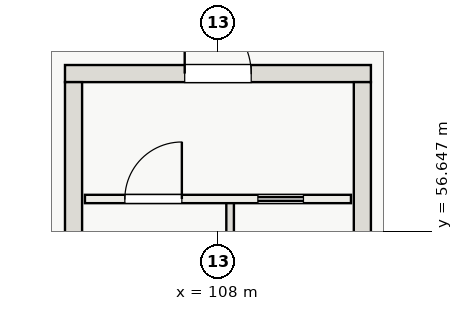
"""IFC4 building model, lengths in metres.
Left out: names, types, materials, properties, quantities, classifications, styles, units other than length and angle.
Written with IfcOpenShell. Run it as: python <this file> out.ifc"""

import sys

from ifc_helpers import new_model, si_unit, direction, frame, frame_2d, origin, place, context, subcontext, project, spatial, rectangle, extrude, element, fill, save


model = new_model("IFC4")
c1 = context("Model", 3, precision=1e-05, world=origin(), true_north=direction((0.0, 1.0)))
c2 = subcontext(c1, "Body", "Model", "MODEL_VIEW")
j1 = project(units=[si_unit("LENGTHUNIT", "METRE"), si_unit("PLANEANGLEUNIT", "RADIAN")], contexts=[c1])
p1 = place(None, origin())
s1 = spatial("IfcSite", under=j1, at=p1, CompositionType="ELEMENT")
p2 = place(p1, origin())
s2 = spatial("IfcBuilding", under=s1, at=p2, CompositionType="ELEMENT")
p3 = place(p2, frame((0.0, 0.0, 21.6)))
s3 = spatial("IfcBuildingStorey", under=s2, at=p3, CompositionType="ELEMENT", Elevation=21.6)
p4 = place(p3, frame((103.975, 60.8, 0.0), z_axis=(0.0, 0.0, 1.0), x_axis=(1.0, 0.0, 0.0)))
e1 = element("IfcWall", 1, at=p4, inside=s3, PredefinedType="SHEAR", context=c2, shape_type="SweptSolid", body=[
    extrude(rectangle(XDim=8.05, YDim=0.45, at=frame_2d((4.025, 0.0))), origin(), (0.0, 0.0, 1.0), 4.8),
])
p5 = place(p4, frame((3.15, 0.0, 0.0)))
e2 = element("IfcOpeningElement", 2, at=p5, cuts=e1, PredefinedType="OPENING", context=c2, shape_type="SweptSolid", body=[
    extrude(rectangle(XDim=1.75, YDim=2.3, at=frame_2d((0.875, 1.15))), frame((0.0, 0.235, 0.0), z_axis=(0.0, -1.0, 0.0), x_axis=(1.0, 0.0, 0.0)), (0.0, 0.0, 1.0), 0.47),
])
for number, where, z_axis, x_axis in (
    (3, (104.2, 49.425, 0.0), (0.0, 0.0, 1.0), (0.0, 1.0, 0.0)),
    (4, (111.8, 49.425, 0.0), (0.0, 0.0, 1.0), (0.0, 1.0, 0.0)),
):
    element("IfcWall", number, at=place(p3, frame(where, z_axis=z_axis, x_axis=x_axis)), inside=s3, PredefinedType="SHEAR", context=c2, shape_type="SweptSolid", body=[
        extrude(rectangle(XDim=11.15, YDim=0.45, at=frame_2d((5.575, 0.0))), origin(), (0.0, 0.0, 1.0), 4.8),
    ])
p6 = place(p3, frame((108.32, 49.45, 0.0), z_axis=(0.0, 0.0, 1.0), x_axis=(0.0, 1.0, 0.0)))
e5 = element("IfcWall", 5, at=p6, inside=s3, PredefinedType="SOLIDWALL", context=c2, shape_type="SweptSolid", body=[
    extrude(rectangle(XDim=8.0, YDim=0.2, at=frame_2d((4.0, 0.0))), origin(), (0.0, 0.0, 1.0), 4.8),
])
p7 = place(p3, frame((104.5, 57.5, 0.0), z_axis=(0.0, 0.0, 1.0), x_axis=(1.0, 0.0, 0.0)))
e6 = element("IfcWall", 6, at=p7, inside=s3, PredefinedType="SOLIDWALL", context=c2, shape_type="SweptSolid", body=[
    extrude(rectangle(XDim=7.0, YDim=0.22, at=frame_2d((3.5, 0.0))), origin(), (0.0, 0.0, 1.0), 4.53),
])
p8 = place(p7, frame((1.05, 0.0, 0.0)))
e7 = element("IfcOpeningElement", 7, at=p8, cuts=e6, PredefinedType="OPENING", context=c2, shape_type="SweptSolid", body=[
    extrude(rectangle(XDim=1.5, YDim=2.2, at=frame_2d((0.75, 1.1))), frame((0.0, 0.12, 0.0), z_axis=(0.0, -1.0, 0.0), x_axis=(1.0, 0.0, 0.0)), (0.0, 0.0, 1.0), 0.24),
])
p9 = place(p7, frame((4.55, 0.0, 0.0)))
e8 = element("IfcOpeningElement", 8, at=p9, cuts=e6, PredefinedType="OPENING", context=c2, shape_type="SweptSolid", body=[
    extrude(rectangle(XDim=1.2, YDim=2.2, at=frame_2d((0.6, 1.1))), frame((0.0, 0.12, 0.0), z_axis=(0.0, -1.0, 0.0), x_axis=(1.0, 0.0, 0.0)), (0.0, 0.0, 1.0), 0.24),
])
p10 = place(p8, origin())
e9 = element("IfcDoor", 9, at=p10, inside=s3, OperationType="SINGLE_SWING_RIGHT", PredefinedType="DOOR", context=c2, shape_type="SweptSolid", body=[
    extrude(rectangle(XDim=1.5, YDim=2.2, at=frame_2d((0.75, 1.1))), frame((0.0, 0.025, 0.0), z_axis=(0.0, -1.0, 0.0), x_axis=(1.0, 0.0, 0.0)), (0.0, 0.0, 1.0), 0.05),
])
fill(e7, e9)
p11 = place(p9, origin())
e10 = element("IfcDoor", 10, at=p11, inside=s3, OperationType="SLIDING_TO_RIGHT", PredefinedType="DOOR", context=c2, shape_type="SweptSolid", body=[
    extrude(rectangle(XDim=1.2, YDim=2.2, at=frame_2d((0.6, 1.1))), frame((0.0, 0.025, 0.0), z_axis=(0.0, -1.0, 0.0), x_axis=(1.0, 0.0, 0.0)), (0.0, 0.0, 1.0), 0.05),
])
fill(e8, e10)
p12 = place(p5, frame((1.75, 0.0, 0.0), z_axis=(0.0, 0.0, 1.0), x_axis=(-1.0, 0.0, 0.0)))
e11 = element("IfcDoor", 11, at=p12, inside=s3, OperationType="DOUBLE_DOOR_SINGLE_SWING", PredefinedType="DOOR", context=c2, shape_type="SweptSolid", body=[
    extrude(rectangle(XDim=1.75, YDim=2.3, at=frame_2d((0.875, 1.15))), frame((0.0, 0.025, 0.0), z_axis=(0.0, -1.0, 0.0), x_axis=(1.0, 0.0, 0.0)), (0.0, 0.0, 1.0), 0.05),
])
fill(e2, e11)
save(model, sys.argv[1])
